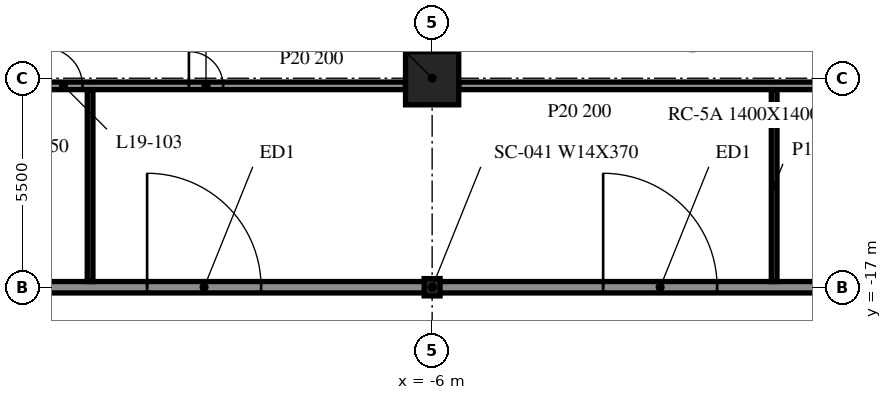
"""IFC4 building model, lengths in metres.
Left out: names, types, materials, properties, quantities, classifications, styles, units other than length and angle.
Written with IfcOpenShell. Run it as: python <this file> out.ifc"""

import sys

from ifc_helpers import new_model, si_unit, direction, frame, frame_2d, origin, origin_2d, place, context, subcontext, project, spatial, rectangle, i_section, extrude, element, fill, save


model = new_model("IFC4")
c1 = context("Model", 3, precision=1e-05, world=origin(), true_north=direction((0.0, 1.0)))
c2 = subcontext(c1, "Body", "Model", "MODEL_VIEW")
j1 = project(units=[si_unit("LENGTHUNIT", "METRE"), si_unit("PLANEANGLEUNIT", "RADIAN")], contexts=[c1])
p1 = place(None, origin())
s1 = spatial("IfcSite", under=j1, at=p1, CompositionType="ELEMENT")
p2 = place(p1, origin())
s2 = spatial("IfcBuilding", under=s1, at=p2, CompositionType="ELEMENT")
p3 = place(p2, frame((0.0, 0.0, 84.8)))
s3 = spatial("IfcBuildingStorey", under=s2, at=p3, CompositionType="ELEMENT", Elevation=84.8)
p4 = place(p3, frame((-6.0, -11.5, -0.34), z_axis=(0.0, 0.0, 1.0), x_axis=(1.0, 0.0, 0.0)))
e1 = element("IfcColumn", 1, at=p4, inside=s3, PredefinedType="COLUMN", context=c2, shape_type="SweptSolid", body=[
    extrude(rectangle(XDim=1.4, YDim=1.4, at=origin_2d()), origin(), (0.0, 0.0, 1.0), 4.1),
])
p5 = place(p3, frame((-6.0, -17.0, -0.34), z_axis=(0.0, 0.0, 1.0), x_axis=(1.0, 0.0, 0.0)))
e2 = element("IfcColumn", 2, at=p5, inside=s3, PredefinedType="COLUMN", context=c2, shape_type="SweptSolid", body=[
    extrude(i_section(OverallWidth=0.419, OverallDepth=0.455, WebThickness=0.042, FlangeThickness=0.068, at=origin_2d()), origin(), (0.0, 0.0, 1.0), 4.1),
])
p6 = place(p3, frame((-17.979, -17.0, 0.0), z_axis=(0.0, 0.0, 1.0), x_axis=(1.0, 0.0, 0.0)))
e3 = element("IfcWall", 3, at=p6, inside=s3, PredefinedType="NOTDEFINED", context=c2, shape_type="SweptSolid", body=[
    extrude(rectangle(XDim=11.958, YDim=0.3, at=frame_2d((5.979, 0.0))), origin(), (0.0, 0.0, 1.0), 3.003),
])
p7 = place(p6, frame((4.479, 0.0, 0.0)))
e4 = element("IfcOpeningElement", 4, at=p7, cuts=e3, PredefinedType="OPENING", context=c2, shape_type="SweptSolid", body=[
    extrude(rectangle(XDim=3.0, YDim=2.4, at=frame_2d((1.5, 1.2))), frame((0.0, 0.16, 0.0), z_axis=(0.0, -1.0, 0.0), x_axis=(1.0, 0.0, 0.0)), (0.0, 0.0, 1.0), 0.32),
])
p8 = place(p3, frame((-5.979, -17.0, 0.0), z_axis=(0.0, 0.0, 1.0), x_axis=(1.0, 0.0, 0.0)))
e5 = element("IfcWall", 5, at=p8, inside=s3, PredefinedType="NOTDEFINED", context=c2, shape_type="SweptSolid", body=[
    extrude(rectangle(XDim=11.958, YDim=0.3, at=frame_2d((5.979, 0.0))), origin(), (0.0, 0.0, 1.0), 3.003),
])
p9 = place(p8, frame((4.479, 0.0, 0.0)))
e6 = element("IfcOpeningElement", 6, at=p9, cuts=e5, PredefinedType="OPENING", context=c2, shape_type="SweptSolid", body=[
    extrude(rectangle(XDim=3.0, YDim=2.4, at=frame_2d((1.5, 1.2))), frame((0.0, 0.16, 0.0), z_axis=(0.0, -1.0, 0.0), x_axis=(1.0, 0.0, 0.0)), (0.0, 0.0, 1.0), 0.32),
])
p10 = place(p3, frame((-17.3, -11.7, 0.0), z_axis=(0.0, 0.0, 1.0), x_axis=(1.0, 0.0, 0.0)))
e7 = element("IfcWall", 7, at=p10, inside=s3, PredefinedType="PARTITIONING", context=c2, shape_type="SweptSolid", body=[
    extrude(rectangle(XDim=10.6, YDim=0.2, at=frame_2d((5.3, 0.0))), origin(), (0.0, 0.0, 1.0), 3.76),
])
p11 = place(p10, frame((1.1, 0.0, 0.0)))
e8 = element("IfcOpeningElement", 8, at=p11, cuts=e7, PredefinedType="OPENING", context=c2, shape_type="SweptSolid", body=[
    extrude(rectangle(XDim=1.0, YDim=2.1, at=frame_2d((0.5, 1.05))), frame((0.0, 0.11, 0.0), z_axis=(0.0, -1.0, 0.0), x_axis=(1.0, 0.0, 0.0)), (0.0, 0.0, 1.0), 0.22),
])
p12 = place(p10, frame((4.9, 0.0, 0.0)))
e9 = element("IfcOpeningElement", 9, at=p12, cuts=e7, PredefinedType="OPENING", context=c2, shape_type="SweptSolid", body=[
    extrude(rectangle(XDim=0.9, YDim=2.1, at=frame_2d((0.45, 1.05))), frame((0.0, 0.11, 0.0), z_axis=(0.0, -1.0, 0.0), x_axis=(1.0, 0.0, 0.0)), (0.0, 0.0, 1.0), 0.22),
])
p13 = place(p3, frame((-5.3, -11.7, 0.0), z_axis=(0.0, 0.0, 1.0), x_axis=(1.0, 0.0, 0.0)))
e10 = element("IfcWall", 10, at=p13, inside=s3, PredefinedType="PARTITIONING", context=c2, shape_type="SweptSolid", body=[
    extrude(rectangle(XDim=10.6, YDim=0.2, at=frame_2d((5.3, 0.0))), origin(), (0.0, 0.0, 1.0), 3.76),
])
for number, where, z_axis, x_axis in (
    (11, (-15.0, -16.85, 0.0), (0.0, 0.0, 1.0), (0.0, 1.0, 0.0)),
    (12, (3.0, -16.85, 0.0), (0.0, 0.0, 1.0), (0.0, 1.0, 0.0)),
):
    element("IfcWall", number, at=place(p3, frame(where, z_axis=z_axis, x_axis=x_axis)), inside=s3, PredefinedType="PARTITIONING", context=c2, shape_type="SweptSolid", body=[
        extrude(rectangle(XDim=5.05, YDim=0.15, at=frame_2d((2.525, 0.0))), origin(), (0.0, 0.0, 1.0), 3.76),
    ])
p14 = place(p7, origin())
e13 = element("IfcDoor", 13, at=p14, inside=s3, OperationType="SINGLE_SWING_LEFT", PredefinedType="DOOR", context=c2, shape_type="SweptSolid", body=[
    extrude(rectangle(XDim=3.0, YDim=2.4, at=frame_2d((1.5, 1.2))), frame((0.0, 0.025, 0.0), z_axis=(0.0, -1.0, 0.0), x_axis=(1.0, 0.0, 0.0)), (0.0, 0.0, 1.0), 0.05),
])
fill(e4, e13)
p15 = place(p9, origin())
e14 = element("IfcDoor", 14, at=p15, inside=s3, OperationType="SINGLE_SWING_LEFT", PredefinedType="DOOR", context=c2, shape_type="SweptSolid", body=[
    extrude(rectangle(XDim=3.0, YDim=2.4, at=frame_2d((1.5, 1.2))), frame((0.0, 0.025, 0.0), z_axis=(0.0, -1.0, 0.0), x_axis=(1.0, 0.0, 0.0)), (0.0, 0.0, 1.0), 0.05),
])
fill(e6, e14)
p16 = place(p11, origin())
e15 = element("IfcDoor", 15, at=p16, inside=s3, OperationType="SINGLE_SWING_RIGHT", PredefinedType="DOOR", context=c2, shape_type="SweptSolid", body=[
    extrude(rectangle(XDim=1.0, YDim=2.1, at=frame_2d((0.5, 1.05))), frame((0.0, 0.025, 0.0), z_axis=(0.0, -1.0, 0.0), x_axis=(1.0, 0.0, 0.0)), (0.0, 0.0, 1.0), 0.05),
])
fill(e8, e15)
p17 = place(p12, origin())
e16 = element("IfcDoor", 16, at=p17, inside=s3, OperationType="SINGLE_SWING_LEFT", PredefinedType="DOOR", context=c2, shape_type="SweptSolid", body=[
    extrude(rectangle(XDim=0.9, YDim=2.1, at=frame_2d((0.45, 1.05))), frame((0.0, 0.025, 0.0), z_axis=(0.0, -1.0, 0.0), x_axis=(1.0, 0.0, 0.0)), (0.0, 0.0, 1.0), 0.05),
])
fill(e9, e16)
save(model, sys.argv[1])
